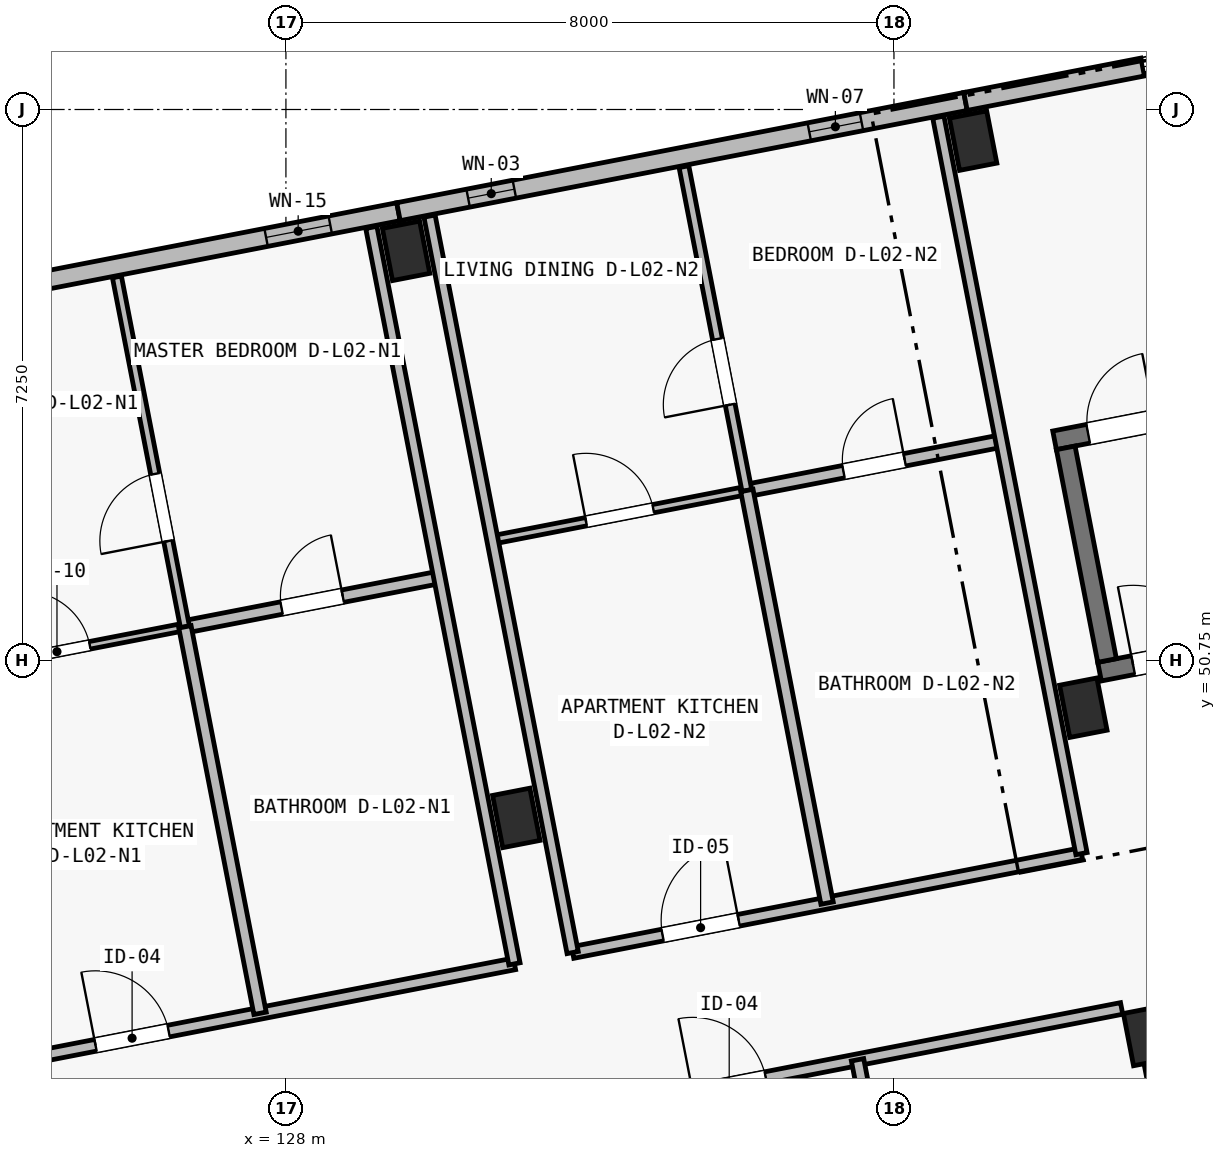
"""IFC4 building model, lengths in metres.
Left out: names, types, materials, properties, quantities, classifications, styles, units other than length and angle.
Written with IfcOpenShell. Run it as: python <this file> out.ifc"""

import sys

from ifc_helpers import new_model, si_unit, direction, frame, frame_2d, origin, origin_2d, place, context, subcontext, project, spatial, rectangle, extrude, element, fill, save


model = new_model("IFC4")
c1 = context("Model", 3, precision=1e-05, world=origin(), true_north=direction((0.0, 1.0)))
c2 = subcontext(c1, "Body", "Model", "MODEL_VIEW")
j1 = project(units=[si_unit("LENGTHUNIT", "METRE"), si_unit("PLANEANGLEUNIT", "RADIAN")], contexts=[c1])
p1 = place(None, origin())
s1 = spatial("IfcSite", under=j1, at=p1, CompositionType="ELEMENT")
p2 = place(p1, origin())
s2 = spatial("IfcBuilding", under=s1, at=p2, CompositionType="ELEMENT")
p3 = place(p2, frame((0.0, 0.0, 8.4)))
s3 = spatial("IfcBuildingStorey", under=s2, at=p3, CompositionType="ELEMENT", Elevation=8.4)
for number, where, z_axis, x_axis in (
    (1, (131.031, 48.68, 0.0), (0.0, 0.0, 1.0), (0.982, 0.191, 0.0)),
    (2, (129.581, 56.14, 0.0), (0.0, 0.0, 1.0), (0.982, 0.191, 0.0)),
    (3, (139.331, 45.811, 0.0), (0.0, 0.0, 1.0), (0.982, 0.191, 0.0)),
    (4, (138.491, 50.13, 0.0), (0.0, 0.0, 1.0), (0.982, 0.191, 0.0)),
    (5, (137.041, 57.59, 0.0), (0.0, 0.0, 1.0), (0.982, 0.191, 0.0)),
):
    element("IfcColumn", number, at=place(p3, frame(where, z_axis=z_axis, x_axis=x_axis)), inside=s3, PredefinedType="COLUMN", context=c2, shape_type="SweptSolid", body=[
        extrude(rectangle(XDim=0.5, YDim=0.7, at=origin_2d()), origin(), (0.0, 0.0, 1.0), 3.25),
    ])
p4 = place(p3, frame((140.714, 38.694, 0.0), z_axis=(0.0, 0.0, 1.0), x_axis=(-0.190819465253, 0.981625148252, 0.0)))
e6 = element("IfcWall", 6, at=p4, inside=s3, PredefinedType="SHEAR", context=c2, shape_type="SweptSolid", body=[
    extrude(rectangle(XDim=6.9, YDim=0.22, at=frame_2d((3.45, 0.0))), origin(), (0.0, 0.0, 1.0), 2.5),
])
p5 = place(p3, frame((138.113, 53.647, 0.0), z_axis=(0.0, 0.0, 1.0), x_axis=(0.981626097708, 0.19081458094, 0.0)))
e7 = element("IfcWall", 7, at=p5, inside=s3, PredefinedType="SHEAR", context=c2, shape_type="SweptSolid", body=[
    extrude(rectangle(XDim=7.0, YDim=0.25, at=frame_2d((3.5, 0.0))), origin(), (0.0, 0.0, 1.0), 3.25),
])
p6 = place(p5, frame((0.45, 0.0, 0.0)))
e8 = element("IfcOpeningElement", 8, at=p6, cuts=e7, PredefinedType="OPENING", context=c2, shape_type="SweptSolid", body=[
    extrude(rectangle(XDim=0.9, YDim=2.1, at=frame_2d((0.45, 1.05))), frame((0.0, 0.14, 0.0), z_axis=(0.0, -1.0, 0.0), x_axis=(1.0, 0.0, 0.0)), (0.0, 0.0, 1.0), 0.28),
])
p7 = place(p3, frame((138.705, 50.604, 0.0), z_axis=(0.0, 0.0, 1.0), x_axis=(0.981626097708, 0.19081458094, 0.0)))
e9 = element("IfcWall", 9, at=p7, inside=s3, PredefinedType="SHEAR", context=c2, shape_type="SweptSolid", body=[
    extrude(rectangle(XDim=7.0, YDim=0.25, at=frame_2d((3.5, 0.0))), origin(), (0.0, 0.0, 1.0), 3.25),
])
p8 = place(p7, frame((0.45, 0.0, 0.0)))
e10 = element("IfcOpeningElement", 10, at=p8, cuts=e9, PredefinedType="OPENING", context=c2, shape_type="SweptSolid", body=[
    extrude(rectangle(XDim=1.05, YDim=2.15, at=frame_2d((0.525, 1.075))), frame((0.0, 0.14, 0.0), z_axis=(0.0, -1.0, 0.0), x_axis=(1.0, 0.0, 0.0)), (0.0, 0.0, 1.0), 0.28),
])
p9 = place(p3, frame((138.804, 50.751, 0.0), z_axis=(0.0, 0.0, 1.0), x_axis=(-0.190858194834, 0.981617618762, 0.0)))
e11 = element("IfcWall", 11, at=p9, inside=s3, PredefinedType="SHEAR", context=c2, shape_type="SweptSolid", body=[
    extrude(rectangle(XDim=2.85, YDim=0.25, at=frame_2d((1.425, 0.0))), origin(), (0.0, 0.0, 1.0), 3.25),
])
p10 = place(p3, frame((122.02, 55.205, 0.0), z_axis=(0.0, 0.0, 1.0), x_axis=(0.981626422232, 0.190812911449, 0.0)))
e12 = element("IfcWall", 12, at=p10, inside=s3, PredefinedType="SOLIDWALL", context=c2, shape_type="SweptSolid", body=[
    extrude(rectangle(XDim=7.6, YDim=0.24, at=frame_2d((3.8, 0.0))), origin(), (0.0, 0.0, 1.0), 3.0),
])
p11 = place(p10, frame((1.354, 0.0, 0.5)))
e13 = element("IfcOpeningElement", 13, at=p11, cuts=e12, PredefinedType="OPENING", context=c2, shape_type="SweptSolid", body=[
    extrude(rectangle(XDim=0.78, YDim=2.2, at=frame_2d((0.39, 1.1))), frame((0.0, 0.135, 0.0), z_axis=(0.0, -1.0, 0.0), x_axis=(1.0, 0.0, 0.0)), (0.0, 0.0, 1.0), 0.27),
])
p12 = place(p10, frame((5.826, 0.0, 0.44)))
e14 = element("IfcOpeningElement", 14, at=p12, cuts=e12, PredefinedType="OPENING", context=c2, shape_type="SweptSolid", body=[
    extrude(rectangle(XDim=0.86, YDim=2.36, at=frame_2d((0.43, 1.18))), frame((0.0, 0.135, 0.0), z_axis=(0.0, -1.0, 0.0), x_axis=(1.0, 0.0, 0.0)), (0.0, 0.0, 1.0), 0.27),
])
p13 = place(p3, frame((129.481, 56.656, 0.0), z_axis=(0.0, 0.0, 1.0), x_axis=(0.981626422232, 0.190812911449, 0.0)))
e15 = element("IfcWall", 15, at=p13, inside=s3, PredefinedType="SOLIDWALL", context=c2, shape_type="SweptSolid", body=[
    extrude(rectangle(XDim=7.6, YDim=0.24, at=frame_2d((3.8, 0.0))), origin(), (0.0, 0.0, 1.0), 3.0),
])
p14 = place(p13, frame((0.934, 0.0, 0.44)))
e16 = element("IfcOpeningElement", 16, at=p14, cuts=e15, PredefinedType="OPENING", context=c2, shape_type="SweptSolid", body=[
    extrude(rectangle(XDim=0.62, YDim=2.28, at=frame_2d((0.31, 1.14))), frame((0.0, 0.135, 0.0), z_axis=(0.0, -1.0, 0.0), x_axis=(1.0, 0.0, 0.0)), (0.0, 0.0, 1.0), 0.27),
])
p15 = place(p13, frame((5.506, 0.0, 0.5)))
e17 = element("IfcOpeningElement", 17, at=p15, cuts=e15, PredefinedType="OPENING", context=c2, shape_type="SweptSolid", body=[
    extrude(rectangle(XDim=0.7, YDim=2.36, at=frame_2d((0.35, 1.18))), frame((0.0, 0.135, 0.0), z_axis=(0.0, -1.0, 0.0), x_axis=(1.0, 0.0, 0.0)), (0.0, 0.0, 1.0), 0.27),
])
p16 = place(p3, frame((136.941, 58.106, 0.0), z_axis=(0.0, 0.0, 1.0), x_axis=(0.981629832251, 0.190795367961, 0.0)))
e18 = element("IfcWall", 18, at=p16, inside=s3, PredefinedType="SOLIDWALL", context=c2, shape_type="SweptSolid", body=[
    extrude(rectangle(XDim=2.375, YDim=0.24, at=frame_2d((1.188, 0.0))), origin(), (0.0, 0.0, 1.0), 3.0),
])
p17 = place(p3, frame((132.046, 44.823, 0.0), z_axis=(0.0, 0.0, 1.0), x_axis=(0.9816234647, 0.190828125677, 0.0)))
e19 = element("IfcWall", 19, at=p17, inside=s3, PredefinedType="PARTITIONING", context=c2, shape_type="SweptSolid", body=[
    extrude(rectangle(XDim=7.08, YDim=0.155, at=frame_2d((3.54, 0.0))), origin(), (0.0, 0.0, 1.0), 2.97),
])
p18 = place(p17, frame((1.33, 0.0, 0.0)))
e20 = element("IfcOpeningElement", 20, at=p18, cuts=e19, PredefinedType="OPENING", context=c2, shape_type="SweptSolid", body=[
    extrude(rectangle(XDim=0.98, YDim=2.15, at=frame_2d((0.49, 1.075))), frame((0.0, 0.093, 0.0), z_axis=(0.0, -1.0, 0.0), x_axis=(1.0, 0.0, 0.0)), (0.0, 0.0, 1.0), 0.185),
])
p19 = place(p3, frame((136.202, 41.994, 0.0), z_axis=(0.0, 0.0, 1.0), x_axis=(-0.190865998276, 0.981616101489, 0.0)))
e21 = element("IfcWall", 21, at=p19, inside=s3, PredefinedType="PLUMBINGWALL", context=c2, shape_type="SweptSolid", body=[
    extrude(rectangle(XDim=3.57, YDim=0.165, at=frame_2d((1.785, 0.0))), origin(), (0.0, 0.0, 1.0), 2.97),
])
p20 = place(p3, frame((124.312, 45.459, 0.0), z_axis=(0.0, 0.0, 1.0), x_axis=(0.981627870431, 0.190805461121, 0.0)))
e22 = element("IfcWall", 22, at=p20, inside=s3, PredefinedType="PARTITIONING", context=c2, shape_type="SweptSolid", body=[
    extrude(rectangle(XDim=6.82, YDim=0.155, at=frame_2d((3.41, 0.0))), origin(), (0.0, 0.0, 1.0), 2.97),
])
p21 = place(p20, frame((1.205, 0.0, 0.0)))
e23 = element("IfcOpeningElement", 23, at=p21, cuts=e22, PredefinedType="OPENING", context=c2, shape_type="SweptSolid", body=[
    extrude(rectangle(XDim=0.98, YDim=2.15, at=frame_2d((0.49, 1.075))), frame((0.0, 0.093, 0.0), z_axis=(0.0, -1.0, 0.0), x_axis=(1.0, 0.0, 0.0)), (0.0, 0.0, 1.0), 0.185),
])
p22 = place(p3, frame((123.324, 50.543, 0.0), z_axis=(0.0, 0.0, 1.0), x_axis=(0.981629173664, 0.190798756314, 0.0)))
e24 = element("IfcWall", 24, at=p22, inside=s3, PredefinedType="PARTITIONING", context=c2, shape_type="SweptSolid", body=[
    extrude(rectangle(XDim=3.41, YDim=0.1, at=frame_2d((1.705, 0.0))), origin(), (0.0, 0.0, 1.0), 2.97),
])
p23 = place(p22, frame((1.255, 0.0, 0.0)))
e25 = element("IfcOpeningElement", 25, at=p23, cuts=e24, PredefinedType="OPENING", context=c2, shape_type="SweptSolid", body=[
    extrude(rectangle(XDim=0.88, YDim=2.1, at=frame_2d((0.44, 1.05))), frame((0.0, 0.065, 0.0), z_axis=(0.0, -1.0, 0.0), x_axis=(1.0, 0.0, 0.0)), (0.0, 0.0, 1.0), 0.13),
])
p24 = place(p3, frame((126.671, 51.194, 0.0), z_axis=(0.0, 0.0, 1.0), x_axis=(0.981629173664, 0.190798756314, 0.0)))
e26 = element("IfcWall", 26, at=p24, inside=s3, PredefinedType="PLUMBINGWALL", context=c2, shape_type="SweptSolid", body=[
    extrude(rectangle(XDim=3.41, YDim=0.165, at=frame_2d((1.705, 0.0))), origin(), (0.0, 0.0, 1.0), 2.97),
])
p25 = place(p24, frame((1.295, 0.0, 0.0)))
e27 = element("IfcOpeningElement", 27, at=p25, cuts=e26, PredefinedType="OPENING", context=c2, shape_type="SweptSolid", body=[
    extrude(rectangle(XDim=0.82, YDim=2.08, at=frame_2d((0.41, 1.04))), frame((0.0, 0.097, 0.0), z_axis=(0.0, -1.0, 0.0), x_axis=(1.0, 0.0, 0.0)), (0.0, 0.0, 1.0), 0.195),
])
p26 = place(p3, frame((126.671, 51.194, 0.0), z_axis=(0.0, 0.0, 1.0), x_axis=(-0.190787451574, 0.981631370893, 0.0)))
e28 = element("IfcWall", 28, at=p26, inside=s3, PredefinedType="PARTITIONING", context=c2, shape_type="SweptSolid", body=[
    extrude(rectangle(XDim=4.69, YDim=0.12, at=frame_2d((2.345, 0.0))), origin(), (0.0, 0.0, 1.0), 2.97),
])
p27 = place(p26, frame((1.15, 0.0, 0.0)))
e29 = element("IfcOpeningElement", 29, at=p27, cuts=e28, PredefinedType="OPENING", context=c2, shape_type="SweptSolid", body=[
    extrude(rectangle(XDim=0.9, YDim=2.1, at=frame_2d((0.45, 1.05))), frame((0.0, 0.075, 0.0), z_axis=(0.0, -1.0, 0.0), x_axis=(1.0, 0.0, 0.0)), (0.0, 0.0, 1.0), 0.15),
])
p28 = place(p3, frame((127.66, 46.109, 0.0), z_axis=(0.0, 0.0, 1.0), x_axis=(-0.190838120755, 0.981621521599, 0.0)))
e30 = element("IfcWall", 30, at=p28, inside=s3, PredefinedType="PLUMBINGWALL", context=c2, shape_type="SweptSolid", body=[
    extrude(rectangle(XDim=5.18, YDim=0.165, at=frame_2d((2.59, 0.0))), origin(), (0.0, 0.0, 1.0), 2.97),
])
p29 = place(p3, frame((131.007, 46.76, 0.0), z_axis=(0.0, 0.0, 1.0), x_axis=(-0.190809410863, 0.981627102685, 0.0)))
e31 = element("IfcWall", 31, at=p29, inside=s3, PredefinedType="PARTITIONING", context=c2, shape_type="SweptSolid", body=[
    extrude(rectangle(XDim=9.87, YDim=0.15, at=frame_2d((4.935, 0.0))), origin(), (0.0, 0.0, 1.0), 2.97),
])
p30 = place(p3, frame((131.772, 46.909, 0.0), z_axis=(0.0, 0.0, 1.0), x_axis=(0.981622468528, 0.190833249935, 0.0)))
e32 = element("IfcWall", 32, at=p30, inside=s3, PredefinedType="PARTITIONING", context=c2, shape_type="SweptSolid", body=[
    extrude(rectangle(XDim=6.82, YDim=0.155, at=frame_2d((3.41, 0.0))), origin(), (0.0, 0.0, 1.0), 2.97),
])
p31 = place(p30, frame((1.205, 0.0, 0.0)))
e33 = element("IfcOpeningElement", 33, at=p31, cuts=e32, PredefinedType="OPENING", context=c2, shape_type="SweptSolid", body=[
    extrude(rectangle(XDim=1.02, YDim=2.2, at=frame_2d((0.51, 1.1))), frame((0.0, 0.093, 0.0), z_axis=(0.0, -1.0, 0.0), x_axis=(1.0, 0.0, 0.0)), (0.0, 0.0, 1.0), 0.185),
])
p32 = place(p3, frame((130.717, 52.337, 0.0), z_axis=(0.0, 0.0, 1.0), x_axis=(0.981629173664, 0.190798756314, 0.0)))
e34 = element("IfcWall", 34, at=p32, inside=s3, PredefinedType="PARTITIONING", context=c2, shape_type="SweptSolid", body=[
    extrude(rectangle(XDim=3.41, YDim=0.11, at=frame_2d((1.705, 0.0))), origin(), (0.0, 0.0, 1.0), 2.97),
])
p33 = place(p32, frame((1.255, 0.0, 0.0)))
e35 = element("IfcOpeningElement", 35, at=p33, cuts=e34, PredefinedType="OPENING", context=c2, shape_type="SweptSolid", body=[
    extrude(rectangle(XDim=0.9, YDim=2.1, at=frame_2d((0.45, 1.05))), frame((0.0, 0.07, 0.0), z_axis=(0.0, -1.0, 0.0), x_axis=(1.0, 0.0, 0.0)), (0.0, 0.0, 1.0), 0.14),
])
p34 = place(p3, frame((134.065, 52.988, 0.0), z_axis=(0.0, 0.0, 1.0), x_axis=(0.981629173664, 0.190798756314, 0.0)))
e36 = element("IfcWall", 36, at=p34, inside=s3, PredefinedType="PLUMBINGWALL", context=c2, shape_type="SweptSolid", body=[
    extrude(rectangle(XDim=3.41, YDim=0.165, at=frame_2d((1.705, 0.0))), origin(), (0.0, 0.0, 1.0), 2.97),
])
p35 = place(p34, frame((1.295, 0.0, 0.0)))
e37 = element("IfcOpeningElement", 37, at=p35, cuts=e36, PredefinedType="OPENING", context=c2, shape_type="SweptSolid", body=[
    extrude(rectangle(XDim=0.82, YDim=2.08, at=frame_2d((0.41, 1.04))), frame((0.0, 0.097, 0.0), z_axis=(0.0, -1.0, 0.0), x_axis=(1.0, 0.0, 0.0)), (0.0, 0.0, 1.0), 0.195),
])
p36 = place(p3, frame((134.065, 52.988, 0.0), z_axis=(0.0, 0.0, 1.0), x_axis=(-0.190812443151, 0.981626513262, 0.0)))
e38 = element("IfcWall", 38, at=p36, inside=s3, PredefinedType="PARTITIONING", context=c2, shape_type="SweptSolid", body=[
    extrude(rectangle(XDim=4.34, YDim=0.13, at=frame_2d((2.17, 0.0))), origin(), (0.0, 0.0, 1.0), 2.97),
])
p37 = place(p36, frame((1.15, 0.0, 0.0)))
e39 = element("IfcOpeningElement", 39, at=p37, cuts=e38, PredefinedType="OPENING", context=c2, shape_type="SweptSolid", body=[
    extrude(rectangle(XDim=0.88, YDim=2.1, at=frame_2d((0.44, 1.05))), frame((0.0, 0.08, 0.0), z_axis=(0.0, -1.0, 0.0), x_axis=(1.0, 0.0, 0.0)), (0.0, 0.0, 1.0), 0.16),
])
p38 = place(p3, frame((135.12, 47.559, 0.0), z_axis=(0.0, 0.0, 1.0), x_axis=(-0.190807031124, 0.981627565258, 0.0)))
e40 = element("IfcWall", 40, at=p38, inside=s3, PredefinedType="PLUMBINGWALL", context=c2, shape_type="SweptSolid", body=[
    extrude(rectangle(XDim=5.53, YDim=0.165, at=frame_2d((2.765, 0.0))), origin(), (0.0, 0.0, 1.0), 2.97),
])
p39 = place(p3, frame((131.772, 46.909, 0.0), z_axis=(0.0, 0.0, 1.0), x_axis=(-0.1907855758, 0.981631735462, 0.0)))
e41 = element("IfcWall", 41, at=p39, inside=s3, PredefinedType="PARTITIONING", context=c2, shape_type="SweptSolid", body=[
    extrude(rectangle(XDim=9.87, YDim=0.15, at=frame_2d((4.935, 0.0))), origin(), (0.0, 0.0, 1.0), 2.97),
])
p40 = place(p3, frame((138.467, 48.21, 0.0), z_axis=(0.0, 0.0, 1.0), x_axis=(-0.190814044018, 0.981626202078, 0.0)))
e42 = element("IfcWall", 42, at=p40, inside=s3, PredefinedType="PARTITIONING", context=c2, shape_type="SweptSolid", body=[
    extrude(rectangle(XDim=9.87, YDim=0.15, at=frame_2d((4.935, 0.0))), origin(), (0.0, 0.0, 1.0), 2.97),
])
p41 = place(p12, origin())
e43 = element("IfcWindow", 43, at=p41, inside=s3, PartitioningType="SINGLE_PANEL", PredefinedType="WINDOW", context=c2, shape_type="SweptSolid", body=[
    extrude(rectangle(XDim=0.86, YDim=2.36, at=frame_2d((0.43, 1.18))), frame((0.0, 0.03, 0.0), z_axis=(0.0, -1.0, 0.0), x_axis=(1.0, 0.0, 0.0)), (0.0, 0.0, 1.0), 0.06),
])
fill(e14, e43)
p42 = place(p14, origin())
e44 = element("IfcWindow", 44, at=p42, inside=s3, PartitioningType="SINGLE_PANEL", PredefinedType="WINDOW", context=c2, shape_type="SweptSolid", body=[
    extrude(rectangle(XDim=0.62, YDim=2.28, at=frame_2d((0.31, 1.14))), frame((0.0, 0.03, 0.0), z_axis=(0.0, -1.0, 0.0), x_axis=(1.0, 0.0, 0.0)), (0.0, 0.0, 1.0), 0.06),
])
fill(e16, e44)
p43 = place(p15, origin())
e45 = element("IfcWindow", 45, at=p43, inside=s3, PartitioningType="SINGLE_PANEL", PredefinedType="WINDOW", context=c2, shape_type="SweptSolid", body=[
    extrude(rectangle(XDim=0.7, YDim=2.36, at=frame_2d((0.35, 1.18))), frame((0.0, 0.03, 0.0), z_axis=(0.0, -1.0, 0.0), x_axis=(1.0, 0.0, 0.0)), (0.0, 0.0, 1.0), 0.06),
])
fill(e17, e45)
p44 = place(p18, origin())
e46 = element("IfcDoor", 46, at=p44, inside=s3, OperationType="SINGLE_SWING_LEFT", PredefinedType="DOOR", context=c2, shape_type="SweptSolid", body=[
    extrude(rectangle(XDim=0.98, YDim=2.15, at=frame_2d((0.49, 1.075))), frame((0.0, 0.025, 0.0), z_axis=(0.0, -1.0, 0.0), x_axis=(1.0, 0.0, 0.0)), (0.0, 0.0, 1.0), 0.05),
])
fill(e20, e46)
p45 = place(p21, origin())
e47 = element("IfcDoor", 47, at=p45, inside=s3, OperationType="SINGLE_SWING_LEFT", PredefinedType="DOOR", context=c2, shape_type="SweptSolid", body=[
    extrude(rectangle(XDim=0.98, YDim=2.15, at=frame_2d((0.49, 1.075))), frame((0.0, 0.025, 0.0), z_axis=(0.0, -1.0, 0.0), x_axis=(1.0, 0.0, 0.0)), (0.0, 0.0, 1.0), 0.05),
])
fill(e23, e47)
p46 = place(p23, origin())
e48 = element("IfcDoor", 48, at=p46, inside=s3, OperationType="SINGLE_SWING_LEFT", PredefinedType="DOOR", context=c2, shape_type="SweptSolid", body=[
    extrude(rectangle(XDim=0.88, YDim=2.1, at=frame_2d((0.44, 1.05))), frame((0.0, 0.025, 0.0), z_axis=(0.0, -1.0, 0.0), x_axis=(1.0, 0.0, 0.0)), (0.0, 0.0, 1.0), 0.05),
])
fill(e25, e48)
p47 = place(p25, origin())
e49 = element("IfcDoor", 49, at=p47, inside=s3, OperationType="SINGLE_SWING_RIGHT", PredefinedType="DOOR", context=c2, shape_type="SweptSolid", body=[
    extrude(rectangle(XDim=0.82, YDim=2.08, at=frame_2d((0.41, 1.04))), frame((0.0, 0.025, 0.0), z_axis=(0.0, -1.0, 0.0), x_axis=(1.0, 0.0, 0.0)), (0.0, 0.0, 1.0), 0.05),
])
fill(e27, e49)
p48 = place(p27, origin())
e50 = element("IfcDoor", 50, at=p48, inside=s3, OperationType="SINGLE_SWING_LEFT", PredefinedType="DOOR", context=c2, shape_type="SweptSolid", body=[
    extrude(rectangle(XDim=0.9, YDim=2.1, at=frame_2d((0.45, 1.05))), frame((0.0, 0.025, 0.0), z_axis=(0.0, -1.0, 0.0), x_axis=(1.0, 0.0, 0.0)), (0.0, 0.0, 1.0), 0.05),
])
fill(e29, e50)
p49 = place(p31, origin())
e51 = element("IfcDoor", 51, at=p49, inside=s3, OperationType="SINGLE_SWING_RIGHT", PredefinedType="DOOR", context=c2, shape_type="SweptSolid", body=[
    extrude(rectangle(XDim=1.02, YDim=2.2, at=frame_2d((0.51, 1.1))), frame((0.0, 0.025, 0.0), z_axis=(0.0, -1.0, 0.0), x_axis=(1.0, 0.0, 0.0)), (0.0, 0.0, 1.0), 0.05),
])
fill(e33, e51)
p50 = place(p33, origin())
e52 = element("IfcDoor", 52, at=p50, inside=s3, OperationType="SINGLE_SWING_LEFT", PredefinedType="DOOR", context=c2, shape_type="SweptSolid", body=[
    extrude(rectangle(XDim=0.9, YDim=2.1, at=frame_2d((0.45, 1.05))), frame((0.0, 0.025, 0.0), z_axis=(0.0, -1.0, 0.0), x_axis=(1.0, 0.0, 0.0)), (0.0, 0.0, 1.0), 0.05),
])
fill(e35, e52)
p51 = place(p35, origin())
e53 = element("IfcDoor", 53, at=p51, inside=s3, OperationType="SINGLE_SWING_RIGHT", PredefinedType="DOOR", context=c2, shape_type="SweptSolid", body=[
    extrude(rectangle(XDim=0.82, YDim=2.08, at=frame_2d((0.41, 1.04))), frame((0.0, 0.025, 0.0), z_axis=(0.0, -1.0, 0.0), x_axis=(1.0, 0.0, 0.0)), (0.0, 0.0, 1.0), 0.05),
])
fill(e37, e53)
p52 = place(p37, origin())
e54 = element("IfcDoor", 54, at=p52, inside=s3, OperationType="SINGLE_SWING_LEFT", PredefinedType="DOOR", context=c2, shape_type="SweptSolid", body=[
    extrude(rectangle(XDim=0.88, YDim=2.1, at=frame_2d((0.44, 1.05))), frame((0.0, 0.025, 0.0), z_axis=(0.0, -1.0, 0.0), x_axis=(1.0, 0.0, 0.0)), (0.0, 0.0, 1.0), 0.05),
])
fill(e39, e54)
p53 = place(p8, origin())
e55 = element("IfcDoor", 55, at=p53, inside=s3, OperationType="SINGLE_SWING_LEFT", PredefinedType="DOOR", context=c2, shape_type="SweptSolid", body=[
    extrude(rectangle(XDim=1.05, YDim=2.15, at=frame_2d((0.525, 1.075))), frame((0.0, 0.025, 0.0), z_axis=(0.0, -1.0, 0.0), x_axis=(1.0, 0.0, 0.0)), (0.0, 0.0, 1.0), 0.05),
])
fill(e10, e55)
p54 = place(p6, origin())
e56 = element("IfcDoor", 56, at=p54, inside=s3, OperationType="SINGLE_SWING_RIGHT", PredefinedType="DOOR", context=c2, shape_type="SweptSolid", body=[
    extrude(rectangle(XDim=0.9, YDim=2.1, at=frame_2d((0.45, 1.05))), frame((0.0, 0.025, 0.0), z_axis=(0.0, -1.0, 0.0), x_axis=(1.0, 0.0, 0.0)), (0.0, 0.0, 1.0), 0.05),
])
fill(e8, e56)
save(model, sys.argv[1])
